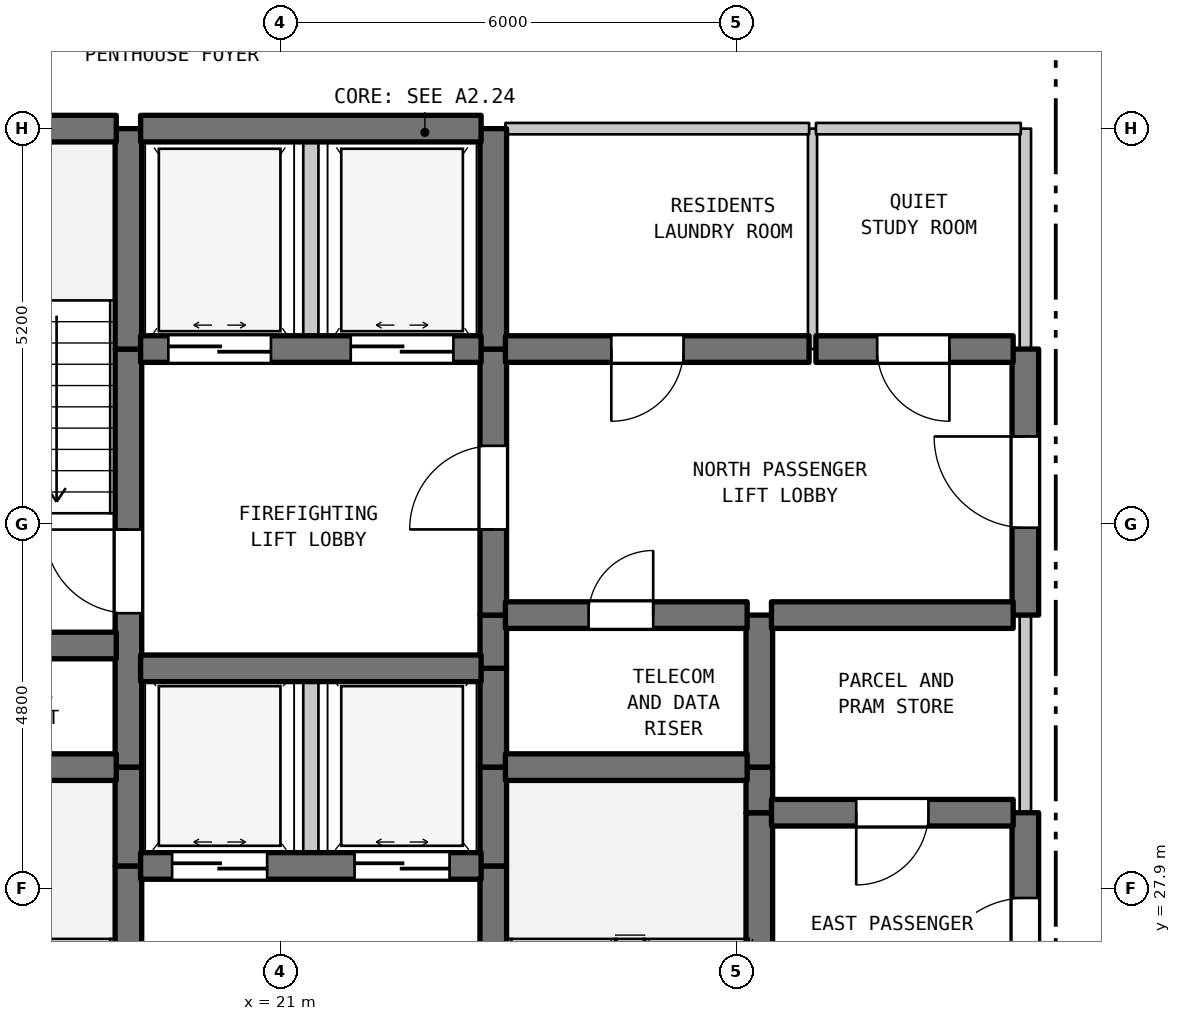
"""IFC4 building model, lengths in metres.
Left out: names, types, materials, properties, quantities, classifications, styles, units other than length and angle.
Written with IfcOpenShell. Run it as: python <this file> out.ifc"""

import sys

from ifc_helpers import new_model, si_unit, direction, frame, frame_2d, origin, place, context, subcontext, project, spatial, rectangle, extrude, element, fill, save


model = new_model("IFC4")
c1 = context("Model", 3, precision=1e-05, world=origin(), true_north=direction((0.0, 1.0)))
c2 = subcontext(c1, "Body", "Model", "MODEL_VIEW")
j1 = project(units=[si_unit("LENGTHUNIT", "METRE"), si_unit("PLANEANGLEUNIT", "RADIAN")], contexts=[c1])
p1 = place(None, origin())
s1 = spatial("IfcSite", under=j1, at=p1, CompositionType="ELEMENT")
p2 = place(p1, origin())
s2 = spatial("IfcBuilding", under=s1, at=p2, CompositionType="ELEMENT")
p3 = place(p2, frame((0.0, 0.0, 233.9)))
s3 = spatial("IfcBuildingStorey", under=s2, at=p3, CompositionType="ELEMENT", Elevation=233.9)
p4 = place(p3, frame((19.0, 22.7, 0.0), z_axis=(0.0, 0.0, 1.0), x_axis=(0.0, 1.0, 0.0)))
e1 = element("IfcWall", 1, at=p4, inside=s3, PredefinedType="SHEAR", context=c2, shape_type="SweptSolid", body=[
    extrude(rectangle(XDim=5.5, YDim=0.35, at=frame_2d((2.75, 0.0))), origin(), (0.0, 0.0, 1.0), 3.28),
])
p5 = place(p4, frame((0.631, 0.0, 0.0)))
e2 = element("IfcOpeningElement", 2, at=p5, cuts=e1, PredefinedType="OPENING", context=c2, shape_type="SweptSolid", body=[
    extrude(rectangle(XDim=1.1, YDim=2.15, at=frame_2d((0.55, 1.075))), frame((0.0, 0.185, 0.0), z_axis=(0.0, -1.0, 0.0), x_axis=(1.0, 0.0, 0.0)), (0.0, 0.0, 1.0), 0.37),
])
p6 = place(p3, frame((19.0, 28.2, 0.0), z_axis=(0.0, 0.0, 1.0), x_axis=(0.0, 1.0, 0.0)))
e3 = element("IfcWall", 3, at=p6, inside=s3, PredefinedType="SHEAR", context=c2, shape_type="SweptSolid", body=[
    extrude(rectangle(XDim=1.3, YDim=0.35, at=frame_2d((0.65, 0.0))), origin(), (0.0, 0.0, 1.0), 3.28),
])
p7 = place(p3, frame((19.0, 29.5, 0.0), z_axis=(0.0, 0.0, 1.0), x_axis=(0.0, 1.0, 0.0)))
e4 = element("IfcWall", 4, at=p7, inside=s3, PredefinedType="SHEAR", context=c2, shape_type="SweptSolid", body=[
    extrude(rectangle(XDim=5.5, YDim=0.35, at=frame_2d((2.75, 0.0))), origin(), (0.0, 0.0, 1.0), 3.28),
])
p8 = place(p7, frame((2.025, 0.0, 0.0)))
e5 = element("IfcOpeningElement", 5, at=p8, cuts=e4, PredefinedType="OPENING", context=c2, shape_type="SweptSolid", body=[
    extrude(rectangle(XDim=1.1, YDim=2.15, at=frame_2d((0.55, 1.075))), frame((0.0, 0.185, 0.0), z_axis=(0.0, -1.0, 0.0), x_axis=(1.0, 0.0, 0.0)), (0.0, 0.0, 1.0), 0.37),
])
p9 = place(p3, frame((19.0, 35.0, 0.0), z_axis=(0.0, 0.0, 1.0), x_axis=(0.0, 1.0, 0.0)))
e6 = element("IfcWall", 6, at=p9, inside=s3, PredefinedType="SHEAR", context=c2, shape_type="SweptSolid", body=[
    extrude(rectangle(XDim=2.9, YDim=0.35, at=frame_2d((1.45, 0.0))), origin(), (0.0, 0.0, 1.0), 3.28),
])
p10 = place(p3, frame((21.4, 28.2, 0.0), z_axis=(0.0, 0.0, 1.0), x_axis=(0.0, 1.0, 0.0)))
e7 = element("IfcWall", 7, at=p10, inside=s3, PredefinedType="STANDARD", context=c2, shape_type="SweptSolid", body=[
    extrude(rectangle(XDim=2.6, YDim=0.2, at=frame_2d((1.3, 0.0))), origin(), (0.0, 0.0, 1.0), 3.28),
])
p11 = place(p3, frame((21.4, 35.0, 0.0), z_axis=(0.0, 0.0, 1.0), x_axis=(0.0, 1.0, 0.0)))
e8 = element("IfcWall", 8, at=p11, inside=s3, PredefinedType="STANDARD", context=c2, shape_type="SweptSolid", body=[
    extrude(rectangle(XDim=2.9, YDim=0.2, at=frame_2d((1.45, 0.0))), origin(), (0.0, 0.0, 1.0), 3.28),
])
p12 = place(p3, frame((23.8, 22.7, 0.0), z_axis=(0.0, 0.0, 1.0), x_axis=(0.0, 1.0, 0.0)))
e9 = element("IfcWall", 9, at=p12, inside=s3, PredefinedType="SHEAR", context=c2, shape_type="SweptSolid", body=[
    extrude(rectangle(XDim=5.5, YDim=0.35, at=frame_2d((2.75, 0.0))), origin(), (0.0, 0.0, 1.0), 3.28),
])
p13 = place(p12, frame((0.235, 0.0, 0.0)))
e10 = element("IfcOpeningElement", 10, at=p13, cuts=e9, PredefinedType="OPENING", context=c2, shape_type="SweptSolid", body=[
    extrude(rectangle(XDim=1.1, YDim=2.15, at=frame_2d((0.55, 1.075))), frame((0.0, 0.185, 0.0), z_axis=(0.0, -1.0, 0.0), x_axis=(1.0, 0.0, 0.0)), (0.0, 0.0, 1.0), 0.37),
])
for number, where, z_axis, x_axis in (
    (11, (23.8, 28.2, 0.0), (0.0, 0.0, 1.0), (0.0, 1.0, 0.0)),
    (12, (23.8, 29.5, 0.0), (0.0, 0.0, 1.0), (0.0, 1.0, 0.0)),
):
    element("IfcWall", number, at=place(p3, frame(where, z_axis=z_axis, x_axis=x_axis)), inside=s3, PredefinedType="SHEAR", context=c2, shape_type="SweptSolid", body=[
        extrude(rectangle(XDim=1.3, YDim=0.35, at=frame_2d((0.65, 0.0))), origin(), (0.0, 0.0, 1.0), 3.28),
    ])
p14 = place(p3, frame((23.8, 30.8, 0.0), z_axis=(0.0, 0.0, 1.0), x_axis=(0.0, 1.0, 0.0)))
e13 = element("IfcWall", 13, at=p14, inside=s3, PredefinedType="SHEAR", context=c2, shape_type="SweptSolid", body=[
    extrude(rectangle(XDim=0.7, YDim=0.35, at=frame_2d((0.35, 0.0))), origin(), (0.0, 0.0, 1.0), 3.28),
])
p15 = place(p3, frame((23.8, 31.5, 0.0), z_axis=(0.0, 0.0, 1.0), x_axis=(0.0, 1.0, 0.0)))
e14 = element("IfcWall", 14, at=p15, inside=s3, PredefinedType="SHEAR", context=c2, shape_type="SweptSolid", body=[
    extrude(rectangle(XDim=3.5, YDim=0.35, at=frame_2d((1.75, 0.0))), origin(), (0.0, 0.0, 1.0), 3.28),
])
p16 = place(p15, frame((1.127, 0.0, 0.0)))
e15 = element("IfcOpeningElement", 15, at=p16, cuts=e14, PredefinedType="OPENING", context=c2, shape_type="SweptSolid", body=[
    extrude(rectangle(XDim=1.1, YDim=2.15, at=frame_2d((0.55, 1.075))), frame((0.0, 0.185, 0.0), z_axis=(0.0, -1.0, 0.0), x_axis=(1.0, 0.0, 0.0)), (0.0, 0.0, 1.0), 0.37),
])
p17 = place(p3, frame((23.8, 35.0, 0.0), z_axis=(0.0, 0.0, 1.0), x_axis=(0.0, 1.0, 0.0)))
e16 = element("IfcWall", 16, at=p17, inside=s3, PredefinedType="SHEAR", context=c2, shape_type="SweptSolid", body=[
    extrude(rectangle(XDim=2.9, YDim=0.35, at=frame_2d((1.45, 0.0))), origin(), (0.0, 0.0, 1.0), 3.28),
])
p18 = place(p3, frame((27.3, 25.6, 0.0), z_axis=(0.0, 0.0, 1.0), x_axis=(0.0, 1.0, 0.0)))
e17 = element("IfcWall", 17, at=p18, inside=s3, PredefinedType="SHEAR", context=c2, shape_type="SweptSolid", body=[
    extrude(rectangle(XDim=3.3, YDim=0.35, at=frame_2d((1.65, 0.0))), origin(), (0.0, 0.0, 1.0), 3.28),
])
p19 = place(p3, frame((27.3, 28.9, 0.0), z_axis=(0.0, 0.0, 1.0), x_axis=(0.0, 1.0, 0.0)))
e18 = element("IfcWall", 18, at=p19, inside=s3, PredefinedType="SHEAR", context=c2, shape_type="SweptSolid", body=[
    extrude(rectangle(XDim=0.6, YDim=0.35, at=frame_2d((0.3, 0.0))), origin(), (0.0, 0.0, 1.0), 3.28),
])
p20 = place(p3, frame((27.3, 29.5, 0.0), z_axis=(0.0, 0.0, 1.0), x_axis=(0.0, 1.0, 0.0)))
e19 = element("IfcWall", 19, at=p20, inside=s3, PredefinedType="SHEAR", context=c2, shape_type="SweptSolid", body=[
    extrude(rectangle(XDim=2.0, YDim=0.35, at=frame_2d((1.0, 0.0))), origin(), (0.0, 0.0, 1.0), 3.28),
])
p21 = place(p3, frame((28.0, 35.0, 0.0), z_axis=(0.0, 0.0, 1.0), x_axis=(0.0, 1.0, 0.0)))
e20 = element("IfcWall", 20, at=p21, inside=s3, PredefinedType="PARTITIONING", context=c2, shape_type="SweptSolid", body=[
    extrude(rectangle(XDim=2.9, YDim=0.12, at=frame_2d((1.45, 0.0))), origin(), (0.0, 0.0, 1.0), 3.28),
])
p22 = place(p3, frame((30.8, 25.6, 0.0), z_axis=(0.0, 0.0, 1.0), x_axis=(0.0, 1.0, 0.0)))
e21 = element("IfcWall", 21, at=p22, inside=s3, PredefinedType="SHEAR", context=c2, shape_type="SweptSolid", body=[
    extrude(rectangle(XDim=3.3, YDim=0.35, at=frame_2d((1.65, 0.0))), origin(), (0.0, 0.0, 1.0), 3.28),
])
p23 = place(p22, frame((0.978, 0.0, 0.0)))
e22 = element("IfcOpeningElement", 22, at=p23, cuts=e21, PredefinedType="OPENING", context=c2, shape_type="SweptSolid", body=[
    extrude(rectangle(XDim=1.2, YDim=2.2, at=frame_2d((0.6, 1.1))), frame((0.0, 0.185, 0.0), z_axis=(0.0, -1.0, 0.0), x_axis=(1.0, 0.0, 0.0)), (0.0, 0.0, 1.0), 0.37),
])
p24 = place(p3, frame((30.8, 28.9, 0.0), z_axis=(0.0, 0.0, 1.0), x_axis=(0.0, 1.0, 0.0)))
e23 = element("IfcWall", 23, at=p24, inside=s3, PredefinedType="STANDARD", context=c2, shape_type="SweptSolid", body=[
    extrude(rectangle(XDim=2.6, YDim=0.15, at=frame_2d((1.3, 0.0))), origin(), (0.0, 0.0, 1.0), 3.28),
])
p25 = place(p3, frame((30.8, 31.5, 0.0), z_axis=(0.0, 0.0, 1.0), x_axis=(0.0, 1.0, 0.0)))
e24 = element("IfcWall", 24, at=p25, inside=s3, PredefinedType="SHEAR", context=c2, shape_type="SweptSolid", body=[
    extrude(rectangle(XDim=3.5, YDim=0.35, at=frame_2d((1.75, 0.0))), origin(), (0.0, 0.0, 1.0), 3.28),
])
p26 = place(p25, frame((1.15, 0.0, 0.0)))
e25 = element("IfcOpeningElement", 25, at=p26, cuts=e24, PredefinedType="OPENING", context=c2, shape_type="SweptSolid", body=[
    extrude(rectangle(XDim=1.2, YDim=2.2, at=frame_2d((0.6, 1.1))), frame((0.0, 0.185, 0.0), z_axis=(0.0, -1.0, 0.0), x_axis=(1.0, 0.0, 0.0)), (0.0, 0.0, 1.0), 0.37),
])
p27 = place(p3, frame((30.8, 35.0, 0.0), z_axis=(0.0, 0.0, 1.0), x_axis=(0.0, 1.0, 0.0)))
e26 = element("IfcWall", 26, at=p27, inside=s3, PredefinedType="STANDARD", context=c2, shape_type="SweptSolid", body=[
    extrude(rectangle(XDim=2.9, YDim=0.15, at=frame_2d((1.45, 0.0))), origin(), (0.0, 0.0, 1.0), 3.28),
])
p28 = place(p3, frame((19.16, 28.2, 0.0), z_axis=(0.0, 0.0, 1.0), x_axis=(1.0, 0.0, 0.0)))
e27 = element("IfcWall", 27, at=p28, inside=s3, PredefinedType="SHEAR", context=c2, shape_type="SweptSolid", body=[
    extrude(rectangle(XDim=4.48, YDim=0.35, at=frame_2d((2.24, 0.0))), origin(), (0.0, 0.0, 1.0), 3.28),
])
p29 = place(p28, frame((0.415, 0.0, 0.0)))
e28 = element("IfcOpeningElement", 28, at=p29, cuts=e27, PredefinedType="OPENING", context=c2, shape_type="SweptSolid", body=[
    extrude(rectangle(XDim=1.25, YDim=2.2, at=frame_2d((0.625, 1.1))), frame((0.0, 0.185, 0.0), z_axis=(0.0, -1.0, 0.0), x_axis=(1.0, 0.0, 0.0)), (0.0, 0.0, 1.0), 0.37),
])
p30 = place(p28, frame((2.815, 0.0, 0.0)))
e29 = element("IfcOpeningElement", 29, at=p30, cuts=e27, PredefinedType="OPENING", context=c2, shape_type="SweptSolid", body=[
    extrude(rectangle(XDim=1.25, YDim=2.2, at=frame_2d((0.625, 1.1))), frame((0.0, 0.185, 0.0), z_axis=(0.0, -1.0, 0.0), x_axis=(1.0, 0.0, 0.0)), (0.0, 0.0, 1.0), 0.37),
])
p31 = place(p3, frame((27.46, 28.9, 0.0), z_axis=(0.0, 0.0, 1.0), x_axis=(1.0, 0.0, 0.0)))
e30 = element("IfcWall", 30, at=p31, inside=s3, PredefinedType="SHEAR", context=c2, shape_type="SweptSolid", body=[
    extrude(rectangle(XDim=3.18, YDim=0.35, at=frame_2d((1.59, 0.0))), origin(), (0.0, 0.0, 1.0), 3.28),
])
p32 = place(p31, frame((1.115, 0.0, 0.0)))
e31 = element("IfcOpeningElement", 31, at=p32, cuts=e30, PredefinedType="OPENING", context=c2, shape_type="SweptSolid", body=[
    extrude(rectangle(XDim=0.95, YDim=2.15, at=frame_2d((0.475, 1.075))), frame((0.0, 0.185, 0.0), z_axis=(0.0, -1.0, 0.0), x_axis=(1.0, 0.0, 0.0)), (0.0, 0.0, 1.0), 0.37),
])
p33 = place(p3, frame((15.16, 29.5, 0.0), z_axis=(0.0, 0.0, 1.0), x_axis=(1.0, 0.0, 0.0)))
e32 = element("IfcWall", 32, at=p33, inside=s3, PredefinedType="SHEAR", context=c2, shape_type="SweptSolid", body=[
    extrude(rectangle(XDim=3.68, YDim=0.35, at=frame_2d((1.84, 0.0))), origin(), (0.0, 0.0, 1.0), 3.28),
])
p34 = place(p3, frame((23.96, 29.5, 0.0), z_axis=(0.0, 0.0, 1.0), x_axis=(1.0, 0.0, 0.0)))
e33 = element("IfcWall", 33, at=p34, inside=s3, PredefinedType="SHEAR", context=c2, shape_type="SweptSolid", body=[
    extrude(rectangle(XDim=3.18, YDim=0.35, at=frame_2d((1.59, 0.0))), origin(), (0.0, 0.0, 1.0), 3.28),
])
p35 = place(p3, frame((19.16, 30.8, 0.0), z_axis=(0.0, 0.0, 1.0), x_axis=(1.0, 0.0, 0.0)))
e34 = element("IfcWall", 34, at=p35, inside=s3, PredefinedType="SHEAR", context=c2, shape_type="SweptSolid", body=[
    extrude(rectangle(XDim=4.48, YDim=0.35, at=frame_2d((2.24, 0.0))), origin(), (0.0, 0.0, 1.0), 3.28),
])
p36 = place(p3, frame((15.16, 31.1, 0.0), z_axis=(0.0, 0.0, 1.0), x_axis=(1.0, 0.0, 0.0)))
e35 = element("IfcWall", 35, at=p36, inside=s3, PredefinedType="SHEAR", context=c2, shape_type="SweptSolid", body=[
    extrude(rectangle(XDim=3.68, YDim=0.35, at=frame_2d((1.84, 0.0))), origin(), (0.0, 0.0, 1.0), 3.28),
])
p37 = place(p3, frame((23.96, 31.5, 0.0), z_axis=(0.0, 0.0, 1.0), x_axis=(1.0, 0.0, 0.0)))
e36 = element("IfcWall", 36, at=p37, inside=s3, PredefinedType="SHEAR", context=c2, shape_type="SweptSolid", body=[
    extrude(rectangle(XDim=3.18, YDim=0.35, at=frame_2d((1.59, 0.0))), origin(), (0.0, 0.0, 1.0), 3.28),
])
p38 = place(p37, frame((1.094, 0.0, 0.0)))
e37 = element("IfcOpeningElement", 37, at=p38, cuts=e36, PredefinedType="OPENING", context=c2, shape_type="SweptSolid", body=[
    extrude(rectangle(XDim=0.85, YDim=2.1, at=frame_2d((0.425, 1.05))), frame((0.0, 0.185, 0.0), z_axis=(0.0, -1.0, 0.0), x_axis=(1.0, 0.0, 0.0)), (0.0, 0.0, 1.0), 0.37),
])
p39 = place(p3, frame((27.46, 31.5, 0.0), z_axis=(0.0, 0.0, 1.0), x_axis=(1.0, 0.0, 0.0)))
e38 = element("IfcWall", 38, at=p39, inside=s3, PredefinedType="SHEAR", context=c2, shape_type="SweptSolid", body=[
    extrude(rectangle(XDim=3.18, YDim=0.35, at=frame_2d((1.59, 0.0))), origin(), (0.0, 0.0, 1.0), 3.28),
])
p40 = place(p3, frame((19.16, 35.0, 0.0), z_axis=(0.0, 0.0, 1.0), x_axis=(1.0, 0.0, 0.0)))
e39 = element("IfcWall", 39, at=p40, inside=s3, PredefinedType="SHEAR", context=c2, shape_type="SweptSolid", body=[
    extrude(rectangle(XDim=4.48, YDim=0.35, at=frame_2d((2.24, 0.0))), origin(), (0.0, 0.0, 1.0), 3.28),
])
p41 = place(p40, frame((0.365, 0.0, 0.0)))
e40 = element("IfcOpeningElement", 40, at=p41, cuts=e39, PredefinedType="OPENING", context=c2, shape_type="SweptSolid", body=[
    extrude(rectangle(XDim=1.35, YDim=2.2, at=frame_2d((0.675, 1.1))), frame((0.0, 0.185, 0.0), z_axis=(0.0, -1.0, 0.0), x_axis=(1.0, 0.0, 0.0)), (0.0, 0.0, 1.0), 0.37),
])
p42 = place(p40, frame((2.765, 0.0, 0.0)))
e41 = element("IfcOpeningElement", 41, at=p42, cuts=e39, PredefinedType="OPENING", context=c2, shape_type="SweptSolid", body=[
    extrude(rectangle(XDim=1.35, YDim=2.2, at=frame_2d((0.675, 1.1))), frame((0.0, 0.185, 0.0), z_axis=(0.0, -1.0, 0.0), x_axis=(1.0, 0.0, 0.0)), (0.0, 0.0, 1.0), 0.37),
])
p43 = place(p3, frame((23.96, 35.0, 0.0), z_axis=(0.0, 0.0, 1.0), x_axis=(1.0, 0.0, 0.0)))
e42 = element("IfcWall", 42, at=p43, inside=s3, PredefinedType="SHEAR", context=c2, shape_type="SweptSolid", body=[
    extrude(rectangle(XDim=3.995, YDim=0.35, at=frame_2d((1.998, 0.0))), origin(), (0.0, 0.0, 1.0), 3.28),
])
p44 = place(p43, frame((1.393, 0.0, 0.0)))
e43 = element("IfcOpeningElement", 43, at=p44, cuts=e42, PredefinedType="OPENING", context=c2, shape_type="SweptSolid", body=[
    extrude(rectangle(XDim=0.95, YDim=2.15, at=frame_2d((0.475, 1.075))), frame((0.0, 0.185, 0.0), z_axis=(0.0, -1.0, 0.0), x_axis=(1.0, 0.0, 0.0)), (0.0, 0.0, 1.0), 0.37),
])
p45 = place(p3, frame((28.045, 35.0, 0.0), z_axis=(0.0, 0.0, 1.0), x_axis=(1.0, 0.0, 0.0)))
e44 = element("IfcWall", 44, at=p45, inside=s3, PredefinedType="SHEAR", context=c2, shape_type="SweptSolid", body=[
    extrude(rectangle(XDim=2.595, YDim=0.35, at=frame_2d((1.297, 0.0))), origin(), (0.0, 0.0, 1.0), 3.28),
])
p46 = place(p45, frame((0.806, 0.0, 0.0)))
e45 = element("IfcOpeningElement", 45, at=p46, cuts=e44, PredefinedType="OPENING", context=c2, shape_type="SweptSolid", body=[
    extrude(rectangle(XDim=0.95, YDim=2.15, at=frame_2d((0.475, 1.075))), frame((0.0, 0.185, 0.0), z_axis=(0.0, -1.0, 0.0), x_axis=(1.0, 0.0, 0.0)), (0.0, 0.0, 1.0), 0.37),
])
p47 = place(p3, frame((15.16, 37.9, 0.0), z_axis=(0.0, 0.0, 1.0), x_axis=(1.0, 0.0, 0.0)))
e46 = element("IfcWall", 46, at=p47, inside=s3, PredefinedType="SHEAR", context=c2, shape_type="SweptSolid", body=[
    extrude(rectangle(XDim=3.68, YDim=0.35, at=frame_2d((1.84, 0.0))), origin(), (0.0, 0.0, 1.0), 3.28),
])
p48 = place(p3, frame((19.16, 37.9, 0.0), z_axis=(0.0, 0.0, 1.0), x_axis=(1.0, 0.0, 0.0)))
e47 = element("IfcWall", 47, at=p48, inside=s3, PredefinedType="SHEAR", context=c2, shape_type="SweptSolid", body=[
    extrude(rectangle(XDim=4.48, YDim=0.35, at=frame_2d((2.24, 0.0))), origin(), (0.0, 0.0, 1.0), 3.28),
])
p49 = place(p3, frame((23.96, 37.9, 0.0), z_axis=(0.0, 0.0, 1.0), x_axis=(1.0, 0.0, 0.0)))
e48 = element("IfcWall", 48, at=p49, inside=s3, PredefinedType="STANDARD", context=c2, shape_type="SweptSolid", body=[
    extrude(rectangle(XDim=3.995, YDim=0.15, at=frame_2d((1.998, 0.0))), origin(), (0.0, 0.0, 1.0), 2.68),
])
p50 = place(p3, frame((28.045, 37.9, 0.0), z_axis=(0.0, 0.0, 1.0), x_axis=(1.0, 0.0, 0.0)))
e49 = element("IfcWall", 49, at=p50, inside=s3, PredefinedType="STANDARD", context=c2, shape_type="SweptSolid", body=[
    extrude(rectangle(XDim=2.695, YDim=0.15, at=frame_2d((1.348, 0.0))), origin(), (0.0, 0.0, 1.0), 2.68),
])
p51 = place(p8, origin())
e50 = element("IfcDoor", 50, at=p51, inside=s3, OperationType="SINGLE_SWING_RIGHT", PredefinedType="DOOR", context=c2, shape_type="SweptSolid", body=[
    extrude(rectangle(XDim=1.1, YDim=2.15, at=frame_2d((0.55, 1.075))), frame((0.0, 0.025, 0.0), z_axis=(0.0, -1.0, 0.0), x_axis=(1.0, 0.0, 0.0)), (0.0, 0.0, 1.0), 0.05),
])
fill(e5, e50)
p52 = place(p16, origin())
e51 = element("IfcDoor", 51, at=p52, inside=s3, OperationType="SINGLE_SWING_LEFT", PredefinedType="DOOR", context=c2, shape_type="SweptSolid", body=[
    extrude(rectangle(XDim=1.1, YDim=2.15, at=frame_2d((0.55, 1.075))), frame((0.0, 0.025, 0.0), z_axis=(0.0, -1.0, 0.0), x_axis=(1.0, 0.0, 0.0)), (0.0, 0.0, 1.0), 0.05),
])
fill(e15, e51)
p53 = place(p23, origin())
e52 = element("IfcDoor", 52, at=p53, inside=s3, OperationType="SINGLE_SWING_LEFT", PredefinedType="DOOR", context=c2, shape_type="SweptSolid", body=[
    extrude(rectangle(XDim=1.2, YDim=2.2, at=frame_2d((0.6, 1.1))), frame((0.0, 0.025, 0.0), z_axis=(0.0, -1.0, 0.0), x_axis=(1.0, 0.0, 0.0)), (0.0, 0.0, 1.0), 0.05),
])
fill(e22, e52)
p54 = place(p26, origin())
e53 = element("IfcDoor", 53, at=p54, inside=s3, OperationType="SINGLE_SWING_RIGHT", PredefinedType="DOOR", context=c2, shape_type="SweptSolid", body=[
    extrude(rectangle(XDim=1.2, YDim=2.2, at=frame_2d((0.6, 1.1))), frame((0.0, 0.025, 0.0), z_axis=(0.0, -1.0, 0.0), x_axis=(1.0, 0.0, 0.0)), (0.0, 0.0, 1.0), 0.05),
])
fill(e25, e53)
p55 = place(p29, origin())
e54 = element("IfcDoor", 54, at=p55, inside=s3, OperationType="DOUBLE_DOOR_SLIDING", PredefinedType="DOOR", context=c2, shape_type="SweptSolid", body=[
    extrude(rectangle(XDim=1.25, YDim=2.2, at=frame_2d((0.625, 1.1))), frame((0.0, 0.025, 0.0), z_axis=(0.0, -1.0, 0.0), x_axis=(1.0, 0.0, 0.0)), (0.0, 0.0, 1.0), 0.05),
])
fill(e28, e54)
p56 = place(p30, origin())
e55 = element("IfcDoor", 55, at=p56, inside=s3, OperationType="DOUBLE_DOOR_SLIDING", PredefinedType="DOOR", context=c2, shape_type="SweptSolid", body=[
    extrude(rectangle(XDim=1.25, YDim=2.2, at=frame_2d((0.625, 1.1))), frame((0.0, 0.025, 0.0), z_axis=(0.0, -1.0, 0.0), x_axis=(1.0, 0.0, 0.0)), (0.0, 0.0, 1.0), 0.05),
])
fill(e29, e55)
p57 = place(p32, frame((0.95, 0.0, 0.0), z_axis=(0.0, 0.0, 1.0), x_axis=(-1.0, 0.0, 0.0)))
e56 = element("IfcDoor", 56, at=p57, inside=s3, OperationType="SINGLE_SWING_LEFT", PredefinedType="DOOR", context=c2, shape_type="SweptSolid", body=[
    extrude(rectangle(XDim=0.95, YDim=2.15, at=frame_2d((0.475, 1.075))), frame((0.0, 0.025, 0.0), z_axis=(0.0, -1.0, 0.0), x_axis=(1.0, 0.0, 0.0)), (0.0, 0.0, 1.0), 0.05),
])
fill(e31, e56)
p58 = place(p38, origin())
e57 = element("IfcDoor", 57, at=p58, inside=s3, OperationType="SINGLE_SWING_RIGHT", PredefinedType="DOOR", context=c2, shape_type="SweptSolid", body=[
    extrude(rectangle(XDim=0.85, YDim=2.1, at=frame_2d((0.425, 1.05))), frame((0.0, 0.025, 0.0), z_axis=(0.0, -1.0, 0.0), x_axis=(1.0, 0.0, 0.0)), (0.0, 0.0, 1.0), 0.05),
])
fill(e37, e57)
p59 = place(p41, origin())
e58 = element("IfcDoor", 58, at=p59, inside=s3, OperationType="DOUBLE_DOOR_SLIDING", PredefinedType="DOOR", context=c2, shape_type="SweptSolid", body=[
    extrude(rectangle(XDim=1.35, YDim=2.2, at=frame_2d((0.675, 1.1))), frame((0.0, 0.025, 0.0), z_axis=(0.0, -1.0, 0.0), x_axis=(1.0, 0.0, 0.0)), (0.0, 0.0, 1.0), 0.05),
])
fill(e40, e58)
p60 = place(p42, origin())
e59 = element("IfcDoor", 59, at=p60, inside=s3, OperationType="DOUBLE_DOOR_SLIDING", PredefinedType="DOOR", context=c2, shape_type="SweptSolid", body=[
    extrude(rectangle(XDim=1.35, YDim=2.2, at=frame_2d((0.675, 1.1))), frame((0.0, 0.025, 0.0), z_axis=(0.0, -1.0, 0.0), x_axis=(1.0, 0.0, 0.0)), (0.0, 0.0, 1.0), 0.05),
])
fill(e41, e59)
p61 = place(p44, frame((0.95, 0.0, 0.0), z_axis=(0.0, 0.0, 1.0), x_axis=(-1.0, 0.0, 0.0)))
e60 = element("IfcDoor", 60, at=p61, inside=s3, OperationType="SINGLE_SWING_LEFT", PredefinedType="DOOR", context=c2, shape_type="SweptSolid", body=[
    extrude(rectangle(XDim=0.95, YDim=2.15, at=frame_2d((0.475, 1.075))), frame((0.0, 0.025, 0.0), z_axis=(0.0, -1.0, 0.0), x_axis=(1.0, 0.0, 0.0)), (0.0, 0.0, 1.0), 0.05),
])
fill(e43, e60)
p62 = place(p46, frame((0.95, 0.0, 0.0), z_axis=(0.0, 0.0, 1.0), x_axis=(-1.0, 0.0, 0.0)))
e61 = element("IfcDoor", 61, at=p62, inside=s3, OperationType="SINGLE_SWING_RIGHT", PredefinedType="DOOR", context=c2, shape_type="SweptSolid", body=[
    extrude(rectangle(XDim=0.95, YDim=2.15, at=frame_2d((0.475, 1.075))), frame((0.0, 0.025, 0.0), z_axis=(0.0, -1.0, 0.0), x_axis=(1.0, 0.0, 0.0)), (0.0, 0.0, 1.0), 0.05),
])
fill(e45, e61)
save(model, sys.argv[1])
